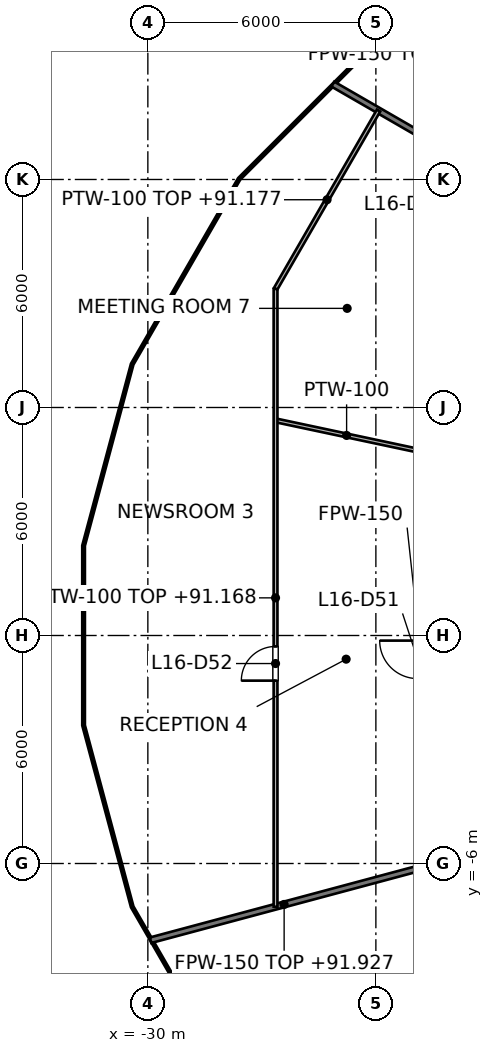
"""IFC4 building model, lengths in metres.
Left out: names, types, materials, properties, quantities, classifications, styles, units other than length and angle.
Written with IfcOpenShell. Run it as: python <this file> out.ifc"""

import sys

from ifc_helpers import new_model, si_unit, direction, frame, frame_2d, origin, place, context, subcontext, project, spatial, rectangle, extrude, element, fill, save


model = new_model("IFC4")
c1 = context("Model", 3, precision=1e-05, world=origin(), true_north=direction((0.0, 1.0)))
c2 = subcontext(c1, "Body", "Model", "MODEL_VIEW")
j1 = project(units=[si_unit("LENGTHUNIT", "METRE"), si_unit("PLANEANGLEUNIT", "RADIAN")], contexts=[c1])
p1 = place(None, origin())
s1 = spatial("IfcSite", under=j1, at=p1, CompositionType="ELEMENT")
p2 = place(p1, origin())
s2 = spatial("IfcBuilding", under=s1, at=p2, CompositionType="ELEMENT")
p3 = place(p2, frame((0.0, 0.0, 88.2)))
s3 = spatial("IfcBuildingStorey", under=s2, at=p3, CompositionType="ELEMENT", Elevation=88.2)
p4 = place(p3, frame((-25.131, 14.509, 0.0), z_axis=(0.0, 0.0, 1.0), x_axis=(0.866037334331, -0.499979335118, 0.0)))
e1 = element("IfcWall", 1, at=p4, inside=s3, PredefinedType="PARTITIONING", context=c2, shape_type="SweptSolid", body=[
    extrude(rectangle(XDim=5.128, YDim=0.15, at=frame_2d((2.564, 0.0))), origin(), (0.0, 0.0, 1.0), 3.045),
])
p5 = place(p3, frame((-29.928, -8.019, 0.0), z_axis=(0.0, 0.0, 1.0), x_axis=(0.965929629594, 0.258804850559, 0.0)))
e2 = element("IfcWall", 2, at=p5, inside=s3, PredefinedType="PARTITIONING", context=c2, shape_type="SweptSolid", body=[
    extrude(rectangle(XDim=7.276, YDim=0.15, at=frame_2d((3.638, 0.0))), origin(), (0.0, 0.0, 1.0), 3.727),
])
p6 = place(p3, frame((-26.64, 5.662, 0.0), z_axis=(0.0, 0.0, 1.0), x_axis=(0.978136613381, -0.207963375533, 0.0)))
e3 = element("IfcWall", 3, at=p6, inside=s3, PredefinedType="PARTITIONING", context=c2, shape_type="SweptSolid", body=[
    extrude(rectangle(XDim=3.823, YDim=0.1, at=frame_2d((1.912, 0.0))), origin(), (0.0, 0.0, 1.0), 3.9),
])
p7 = place(p3, frame((-26.64, 9.119, 0.0), z_axis=(0.0, 0.0, 1.0), x_axis=(0.499955005135, 0.866051380023, 0.0)))
e4 = element("IfcWall", 4, at=p7, inside=s3, PredefinedType="PARTITIONING", context=c2, shape_type="SweptSolid", body=[
    extrude(rectangle(XDim=5.422, YDim=0.1, at=frame_2d((2.711, 0.0))), origin(), (0.0, 0.0, 1.0), 2.977),
])
p8 = place(p3, frame((-26.64, -7.138, 0.0), z_axis=(0.0, 0.0, 1.0), x_axis=(0.0, 1.0, 0.0)))
e5 = element("IfcWall", 5, at=p8, inside=s3, PredefinedType="PARTITIONING", context=c2, shape_type="SweptSolid", body=[
    extrude(rectangle(XDim=16.257, YDim=0.1, at=frame_2d((8.128, 0.0))), origin(), (0.0, 0.0, 1.0), 2.968),
])
p9 = place(p8, frame((5.95, 0.0, 0.0)))
e6 = element("IfcOpeningElement", 6, at=p9, cuts=e5, PredefinedType="OPENING", context=c2, shape_type="SweptSolid", body=[
    extrude(rectangle(XDim=0.9, YDim=2.1, at=frame_2d((0.45, 1.05))), frame((0.0, 0.05, 0.0), z_axis=(0.0, -1.0, 0.0), x_axis=(1.0, 0.0, 0.0)), (0.0, 0.0, 1.0), 0.1),
])
p10 = place(p9, origin())
e7 = element("IfcDoor", 7, at=p10, inside=s3, OperationType="SINGLE_SWING_LEFT", PredefinedType="DOOR", context=c2, shape_type="SweptSolid", body=[
    extrude(rectangle(XDim=0.9, YDim=2.1, at=frame_2d((0.45, 1.05))), frame((0.0, 0.025, 0.0), z_axis=(0.0, -1.0, 0.0), x_axis=(1.0, 0.0, 0.0)), (0.0, 0.0, 1.0), 0.05),
])
fill(e6, e7)
save(model, sys.argv[1])
